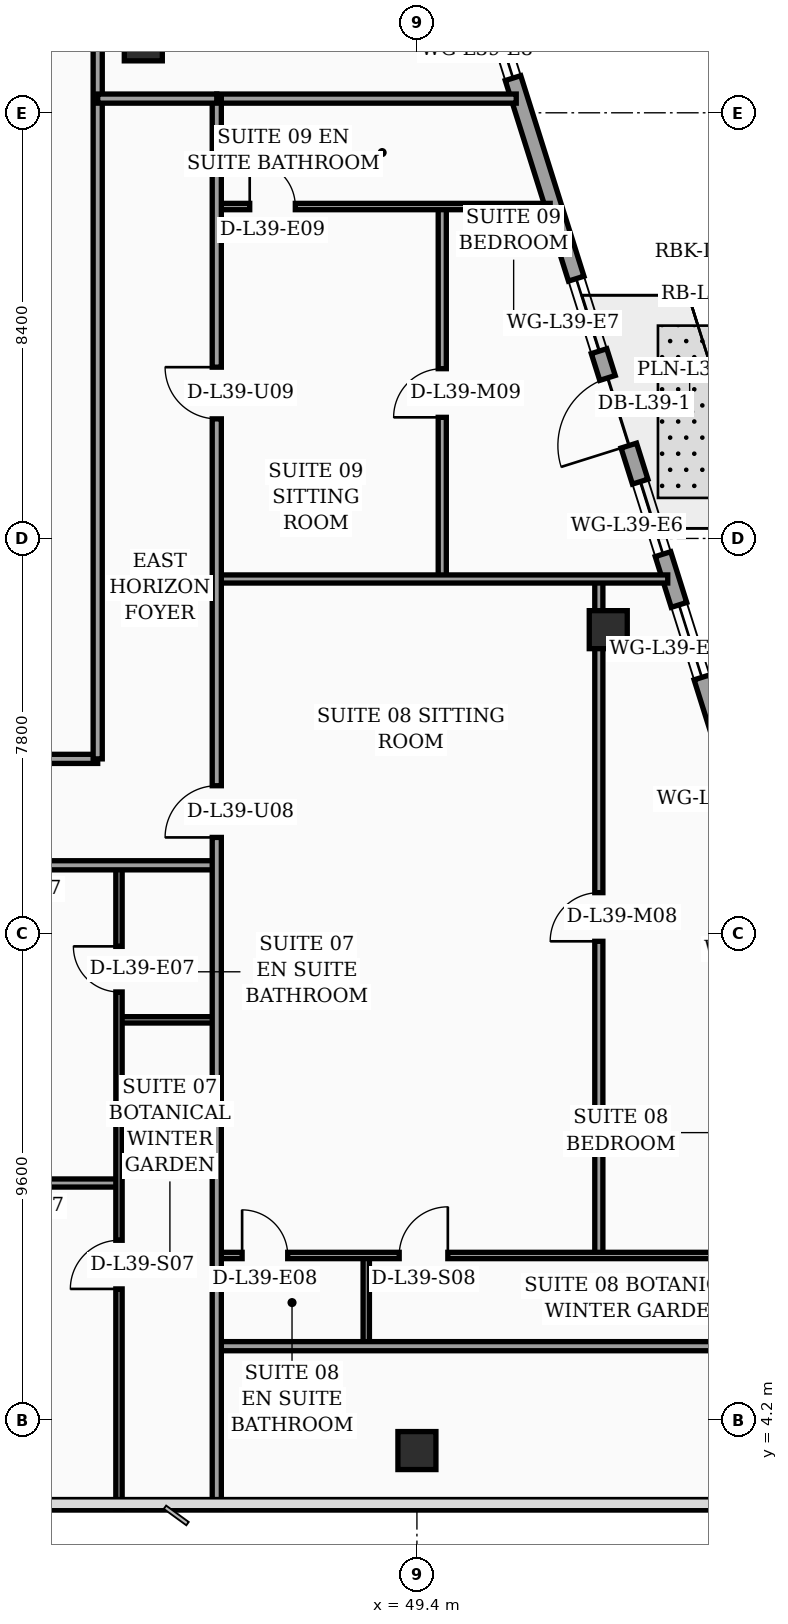
"""IFC4 building model, lengths in metres.
Left out: names, types, materials, properties, quantities, classifications, styles, units other than length and angle.
Written with IfcOpenShell. Run it as: python <this file> out.ifc"""

import sys

from ifc_helpers import new_model, si_unit, direction, frame, frame_2d, origin, origin_2d, place, context, subcontext, project, spatial, rectangle, hollow_rectangle, extrude, element, fill, save


model = new_model("IFC4")
c1 = context("Model", 3, precision=1e-05, world=origin(), true_north=direction((0.0, 1.0)))
c2 = subcontext(c1, "Body", "Model", "MODEL_VIEW")
j1 = project(units=[si_unit("LENGTHUNIT", "METRE"), si_unit("PLANEANGLEUNIT", "RADIAN")], contexts=[c1])
p1 = place(None, origin())
s1 = spatial("IfcSite", under=j1, at=p1, CompositionType="ELEMENT")
p2 = place(p1, origin())
s2 = spatial("IfcBuilding", under=s1, at=p2, CompositionType="ELEMENT")
p3 = place(p2, frame((0.0, 0.0, 159.9)))
s3 = spatial("IfcBuildingStorey", under=s2, at=p3, CompositionType="ELEMENT", Elevation=159.9)
for number, where, z_axis, x_axis in (
    (1, (49.4, 3.6, 0.0), (0.0, 0.0, 1.0), (1.0, 0.0, 0.0)),
    (2, (44.0, 31.4, 0.0), (0.0, 0.0, 1.0), (1.0, 0.0, 0.0)),
    (3, (53.176, 19.8, 0.0), (0.0, 0.0, 1.0), (1.0, 0.0, 0.0)),
):
    element("IfcColumn", number, at=place(p3, frame(where, z_axis=z_axis, x_axis=x_axis)), inside=s3, PredefinedType="COLUMN", context=c2, shape_type="SweptSolid", body=[
        extrude(hollow_rectangle(XDim=0.75, YDim=0.75, WallThickness=0.032, at=origin_2d()), origin(), (0.0, 0.0, 1.0), 3.56),
    ])
p4 = place(p3, frame((59.23, 5.505, 0.0), z_axis=(0.0, 0.0, 1.0), x_axis=(-0.300509063924, 0.953778958931, 0.0)))
e4 = element("IfcWall", 4, at=p4, inside=s3, PredefinedType="SOLIDWALL", context=c2, shape_type="SweptSolid", body=[
    extrude(rectangle(XDim=30.814, YDim=0.32, at=frame_2d((15.407, 0.0))), origin(), (0.0, 0.0, 1.0), 3.56),
])
p5 = place(p4, frame((18.796, 0.0, 0.0)))
e5 = element("IfcOpeningElement", 5, at=p5, cuts=e4, PredefinedType="OPENING", context=c2, shape_type="SweptSolid", body=[
    extrude(rectangle(XDim=1.4, YDim=2.25, at=frame_2d((0.7, 1.125))), frame((0.0, 0.17, 0.0), z_axis=(0.0, -1.0, 0.0), x_axis=(1.0, 0.0, 0.0)), (0.0, 0.0, 1.0), 0.34),
])
p6 = place(p4, frame((2.65, 0.0, 0.75)))
e6 = element("IfcOpeningElement", 6, at=p6, cuts=e4, PredefinedType="OPENING", context=c2, shape_type="SweptSolid", body=[
    extrude(rectangle(XDim=1.5, YDim=1.6, at=frame_2d((0.75, 0.8))), frame((0.0, 0.17, 0.0), z_axis=(0.0, -1.0, 0.0), x_axis=(1.0, 0.0, 0.0)), (0.0, 0.0, 1.0), 0.34),
])
p7 = place(p4, frame((4.7, 0.0, 0.75)))
e7 = element("IfcOpeningElement", 7, at=p7, cuts=e4, PredefinedType="OPENING", context=c2, shape_type="SweptSolid", body=[
    extrude(rectangle(XDim=1.5, YDim=1.6, at=frame_2d((0.75, 0.8))), frame((0.0, 0.17, 0.0), z_axis=(0.0, -1.0, 0.0), x_axis=(1.0, 0.0, 0.0)), (0.0, 0.0, 1.0), 0.34),
])
p8 = place(p4, frame((7.8, 0.0, 0.75)))
e8 = element("IfcOpeningElement", 8, at=p8, cuts=e4, PredefinedType="OPENING", context=c2, shape_type="SweptSolid", body=[
    extrude(rectangle(XDim=1.5, YDim=1.6, at=frame_2d((0.75, 0.8))), frame((0.0, 0.17, 0.0), z_axis=(0.0, -1.0, 0.0), x_axis=(1.0, 0.0, 0.0)), (0.0, 0.0, 1.0), 0.34),
])
p9 = place(p4, frame((10.9, 0.0, 0.75)))
e9 = element("IfcOpeningElement", 9, at=p9, cuts=e4, PredefinedType="OPENING", context=c2, shape_type="SweptSolid", body=[
    extrude(rectangle(XDim=1.5, YDim=1.6, at=frame_2d((0.75, 0.8))), frame((0.0, 0.17, 0.0), z_axis=(0.0, -1.0, 0.0), x_axis=(1.0, 0.0, 0.0)), (0.0, 0.0, 1.0), 0.34),
])
p10 = place(p4, frame((14.0, 0.0, 0.75)))
e10 = element("IfcOpeningElement", 10, at=p10, cuts=e4, PredefinedType="OPENING", context=c2, shape_type="SweptSolid", body=[
    extrude(rectangle(XDim=1.5, YDim=1.6, at=frame_2d((0.75, 0.8))), frame((0.0, 0.17, 0.0), z_axis=(0.0, -1.0, 0.0), x_axis=(1.0, 0.0, 0.0)), (0.0, 0.0, 1.0), 0.34),
])
p11 = place(p4, frame((16.55, 0.0, 0.75)))
e11 = element("IfcOpeningElement", 11, at=p11, cuts=e4, PredefinedType="OPENING", context=c2, shape_type="SweptSolid", body=[
    extrude(rectangle(XDim=1.5, YDim=1.6, at=frame_2d((0.75, 0.8))), frame((0.0, 0.17, 0.0), z_axis=(0.0, -1.0, 0.0), x_axis=(1.0, 0.0, 0.0)), (0.0, 0.0, 1.0), 0.34),
])
p12 = place(p4, frame((20.75, 0.0, 0.75)))
e12 = element("IfcOpeningElement", 12, at=p12, cuts=e4, PredefinedType="OPENING", context=c2, shape_type="SweptSolid", body=[
    extrude(rectangle(XDim=1.5, YDim=1.6, at=frame_2d((0.75, 0.8))), frame((0.0, 0.17, 0.0), z_axis=(0.0, -1.0, 0.0), x_axis=(1.0, 0.0, 0.0)), (0.0, 0.0, 1.0), 0.34),
])
p13 = place(p4, frame((26.4, 0.0, 0.75)))
e13 = element("IfcOpeningElement", 13, at=p13, cuts=e4, PredefinedType="OPENING", context=c2, shape_type="SweptSolid", body=[
    extrude(rectangle(XDim=1.5, YDim=1.6, at=frame_2d((0.75, 0.8))), frame((0.0, 0.17, 0.0), z_axis=(0.0, -1.0, 0.0), x_axis=(1.0, 0.0, 0.0)), (0.0, 0.0, 1.0), 0.34),
])
p14 = place(p3, frame((43.52, 12.1, 0.0), z_axis=(0.0, 0.0, 1.0), x_axis=(1.0, 0.0, 0.0)))
e14 = element("IfcWall", 14, at=p14, inside=s3, PredefinedType="PARTITIONING", context=c2, shape_type="SweptSolid", body=[
    extrude(rectangle(XDim=1.93, YDim=0.125, at=frame_2d((0.965, 0.0))), origin(), (0.0, 0.0, 1.0), 3.56),
])
p15 = place(p3, frame((39.15, 8.88, 0.0), z_axis=(0.0, 0.0, 1.0), x_axis=(1.0, 0.0, 0.0)))
e15 = element("IfcWall", 15, at=p15, inside=s3, PredefinedType="PARTITIONING", context=c2, shape_type="SweptSolid", body=[
    extrude(rectangle(XDim=4.37, YDim=0.16, at=frame_2d((2.185, 0.0))), origin(), (0.0, 0.0, 1.0), 3.56),
])
p16 = place(p15, frame((1.71, 0.0, 0.0)))
e16 = element("IfcOpeningElement", 16, at=p16, cuts=e15, PredefinedType="OPENING", context=c2, shape_type="SweptSolid", body=[
    extrude(rectangle(XDim=0.96, YDim=2.2, at=frame_2d((0.48, 1.1))), frame((0.0, 0.09, 0.0), z_axis=(0.0, -1.0, 0.0), x_axis=(1.0, 0.0, 0.0)), (0.0, 0.0, 1.0), 0.18),
])
p17 = place(p3, frame((43.52, 2.44, 0.0), z_axis=(0.0, 0.0, 1.0), x_axis=(0.0, 1.0, 0.0)))
e17 = element("IfcWall", 17, at=p17, inside=s3, PredefinedType="PARTITIONING", context=c2, shape_type="SweptSolid", body=[
    extrude(rectangle(XDim=12.71, YDim=0.125, at=frame_2d((6.355, 0.0))), origin(), (0.0, 0.0, 1.0), 3.04),
])
p18 = place(p17, frame((4.35, 0.0, 0.0)))
e18 = element("IfcOpeningElement", 18, at=p18, cuts=e17, PredefinedType="OPENING", context=c2, shape_type="SweptSolid", body=[
    extrude(rectangle(XDim=0.96, YDim=2.2, at=frame_2d((0.48, 1.1))), frame((0.0, 0.073, 0.0), z_axis=(0.0, -1.0, 0.0), x_axis=(1.0, 0.0, 0.0)), (0.0, 0.0, 1.0), 0.145),
])
p19 = place(p17, frame((10.21, 0.0, 0.0)))
e19 = element("IfcOpeningElement", 19, at=p19, cuts=e17, PredefinedType="OPENING", context=c2, shape_type="SweptSolid", body=[
    extrude(rectangle(XDim=0.9, YDim=2.15, at=frame_2d((0.45, 1.075))), frame((0.0, 0.073, 0.0), z_axis=(0.0, -1.0, 0.0), x_axis=(1.0, 0.0, 0.0)), (0.0, 0.0, 1.0), 0.145),
])
p20 = place(p3, frame((32.4, 15.15, 0.0), z_axis=(0.0, 0.0, 1.0), x_axis=(1.0, 0.0, 0.0)))
e20 = element("IfcWall", 20, at=p20, inside=s3, PredefinedType="PARTITIONING", context=c2, shape_type="SweptSolid", body=[
    extrude(rectangle(XDim=13.05, YDim=0.18, at=frame_2d((6.525, 0.0))), origin(), (0.0, 0.0, 1.0), 2.94),
])
p21 = place(p20, frame((2.0, 0.0, 0.0)))
e21 = element("IfcOpeningElement", 21, at=p21, cuts=e20, PredefinedType="OPENING", context=c2, shape_type="SweptSolid", body=[
    extrude(rectangle(XDim=1.02, YDim=2.2, at=frame_2d((0.51, 1.1))), frame((0.0, 0.1, 0.0), z_axis=(0.0, -1.0, 0.0), x_axis=(1.0, 0.0, 0.0)), (0.0, 0.0, 1.0), 0.2),
])
p22 = place(p20, frame((8.43, 0.0, 0.0)))
e22 = element("IfcOpeningElement", 22, at=p22, cuts=e20, PredefinedType="OPENING", context=c2, shape_type="SweptSolid", body=[
    extrude(rectangle(XDim=1.02, YDim=2.2, at=frame_2d((0.51, 1.1))), frame((0.0, 0.1, 0.0), z_axis=(0.0, -1.0, 0.0), x_axis=(1.0, 0.0, 0.0)), (0.0, 0.0, 1.0), 0.2),
])
p23 = place(p3, frame((21.5, 17.25, 0.0), z_axis=(0.0, 0.0, 1.0), x_axis=(1.0, 0.0, 0.0)))
e23 = element("IfcWall", 23, at=p23, inside=s3, PredefinedType="PARTITIONING", context=c2, shape_type="SweptSolid", body=[
    extrude(rectangle(XDim=21.6, YDim=0.18, at=frame_2d((10.8, 0.0))), origin(), (0.0, 0.0, 1.0), 2.94),
])
p24 = place(p23, frame((0.95, 0.0, 0.0)))
e24 = element("IfcOpeningElement", 24, at=p24, cuts=e23, PredefinedType="OPENING", context=c2, shape_type="SweptSolid", body=[
    extrude(rectangle(XDim=1.02, YDim=2.2, at=frame_2d((0.51, 1.1))), frame((0.0, 0.1, 0.0), z_axis=(0.0, -1.0, 0.0), x_axis=(1.0, 0.0, 0.0)), (0.0, 0.0, 1.0), 0.2),
])
p25 = place(p23, frame((8.77, 0.0, 0.0)))
e25 = element("IfcOpeningElement", 25, at=p25, cuts=e23, PredefinedType="OPENING", context=c2, shape_type="SweptSolid", body=[
    extrude(rectangle(XDim=1.02, YDim=2.2, at=frame_2d((0.51, 1.1))), frame((0.0, 0.1, 0.0), z_axis=(0.0, -1.0, 0.0), x_axis=(1.0, 0.0, 0.0)), (0.0, 0.0, 1.0), 0.2),
])
p26 = place(p23, frame((15.28, 0.0, 0.0)))
e26 = element("IfcOpeningElement", 26, at=p26, cuts=e23, PredefinedType="OPENING", context=c2, shape_type="SweptSolid", body=[
    extrude(rectangle(XDim=1.02, YDim=2.2, at=frame_2d((0.51, 1.1))), frame((0.0, 0.1, 0.0), z_axis=(0.0, -1.0, 0.0), x_axis=(1.0, 0.0, 0.0)), (0.0, 0.0, 1.0), 0.2),
])
p27 = place(p3, frame((43.1, 17.25, 0.0), z_axis=(0.0, 0.0, 1.0), x_axis=(0.0, 1.0, 0.0)))
e27 = element("IfcWall", 27, at=p27, inside=s3, PredefinedType="PARTITIONING", context=c2, shape_type="SweptSolid", body=[
    extrude(rectangle(XDim=19.21, YDim=0.18, at=frame_2d((9.605, 0.0))), origin(), (0.0, 0.0, 1.0), 2.94),
])
p28 = place(p3, frame((48.4, 5.66, 0.0), z_axis=(0.0, 0.0, 1.0), x_axis=(0.0, 1.0, 0.0)))
e28 = element("IfcWall", 28, at=p28, inside=s3, PredefinedType="PARTITIONING", context=c2, shape_type="SweptSolid", body=[
    extrude(rectangle(XDim=1.79, YDim=0.125, at=frame_2d((0.895, 0.0))), origin(), (0.0, 0.0, 1.0), 2.94),
])
p29 = place(p3, frame((52.99, 7.45, 0.0), z_axis=(0.0, 0.0, 1.0), x_axis=(0.0, 1.0, 0.0)))
e29 = element("IfcWall", 29, at=p29, inside=s3, PredefinedType="PARTITIONING", context=c2, shape_type="SweptSolid", body=[
    extrude(rectangle(XDim=13.35, YDim=0.16, at=frame_2d((6.675, 0.0))), origin(), (0.0, 0.0, 1.0), 2.94),
])
p30 = place(p29, frame((6.2, 0.0, 0.0)))
e30 = element("IfcOpeningElement", 30, at=p30, cuts=e29, PredefinedType="OPENING", context=c2, shape_type="SweptSolid", body=[
    extrude(rectangle(XDim=0.96, YDim=2.2, at=frame_2d((0.48, 1.1))), frame((0.0, 0.09, 0.0), z_axis=(0.0, -1.0, 0.0), x_axis=(1.0, 0.0, 0.0)), (0.0, 0.0, 1.0), 0.18),
])
p31 = place(p3, frame((45.45, 7.45, 0.0), z_axis=(0.0, 0.0, 1.0), x_axis=(1.0, 0.0, 0.0)))
e31 = element("IfcWall", 31, at=p31, inside=s3, PredefinedType="PARTITIONING", context=c2, shape_type="SweptSolid", body=[
    extrude(rectangle(XDim=13.11, YDim=0.125, at=frame_2d((6.555, 0.0))), origin(), (0.0, 0.0, 1.0), 2.94),
])
p32 = place(p31, frame((0.5, 0.0, 0.0)))
e32 = element("IfcOpeningElement", 32, at=p32, cuts=e31, PredefinedType="OPENING", context=c2, shape_type="SweptSolid", body=[
    extrude(rectangle(XDim=0.9, YDim=2.15, at=frame_2d((0.45, 1.075))), frame((0.0, 0.073, 0.0), z_axis=(0.0, -1.0, 0.0), x_axis=(1.0, 0.0, 0.0)), (0.0, 0.0, 1.0), 0.145),
])
p33 = place(p31, frame((3.6, 0.0, 0.0)))
e33 = element("IfcOpeningElement", 33, at=p33, cuts=e31, PredefinedType="OPENING", context=c2, shape_type="SweptSolid", body=[
    extrude(rectangle(XDim=0.96, YDim=2.2, at=frame_2d((0.48, 1.1))), frame((0.0, 0.073, 0.0), z_axis=(0.0, -1.0, 0.0), x_axis=(1.0, 0.0, 0.0)), (0.0, 0.0, 1.0), 0.145),
])
p34 = place(p3, frame((45.45, 5.66, 0.0), z_axis=(0.0, 0.0, 1.0), x_axis=(1.0, 0.0, 0.0)))
e34 = element("IfcWall", 34, at=p34, inside=s3, PredefinedType="PARTITIONING", context=c2, shape_type="SweptSolid", body=[
    extrude(rectangle(XDim=10.55, YDim=0.18, at=frame_2d((5.275, 0.0))), origin(), (0.0, 0.0, 1.0), 2.94),
])
p35 = place(p3, frame((49.9, 20.8, 0.0), z_axis=(0.0, 0.0, 1.0), x_axis=(0.0, 1.0, 0.0)))
e35 = element("IfcWall", 35, at=p35, inside=s3, PredefinedType="PARTITIONING", context=c2, shape_type="SweptSolid", body=[
    extrude(rectangle(XDim=7.35, YDim=0.16, at=frame_2d((3.675, 0.0))), origin(), (0.0, 0.0, 1.0), 3.04),
])
p36 = place(p35, frame((3.19, 0.0, 0.0)))
e36 = element("IfcOpeningElement", 36, at=p36, cuts=e35, PredefinedType="OPENING", context=c2, shape_type="SweptSolid", body=[
    extrude(rectangle(XDim=0.96, YDim=2.2, at=frame_2d((0.48, 1.1))), frame((0.0, 0.09, 0.0), z_axis=(0.0, -1.0, 0.0), x_axis=(1.0, 0.0, 0.0)), (0.0, 0.0, 1.0), 0.18),
])
p37 = place(p3, frame((45.45, 28.15, 0.0), z_axis=(0.0, 0.0, 1.0), x_axis=(1.0, 0.0, 0.0)))
e37 = element("IfcWall", 37, at=p37, inside=s3, PredefinedType="PARTITIONING", context=c2, shape_type="SweptSolid", body=[
    extrude(rectangle(XDim=6.58, YDim=0.125, at=frame_2d((3.29, 0.0))), origin(), (0.0, 0.0, 1.0), 3.04),
])
p38 = place(p37, frame((0.65, 0.0, 0.0)))
e38 = element("IfcOpeningElement", 38, at=p38, cuts=e37, PredefinedType="OPENING", context=c2, shape_type="SweptSolid", body=[
    extrude(rectangle(XDim=0.9, YDim=2.15, at=frame_2d((0.45, 1.075))), frame((0.0, 0.073, 0.0), z_axis=(0.0, -1.0, 0.0), x_axis=(1.0, 0.0, 0.0)), (0.0, 0.0, 1.0), 0.145),
])
p39 = place(p3, frame((45.45, 20.8, 0.0), z_axis=(0.0, 0.0, 1.0), x_axis=(1.0, 0.0, 0.0)))
e39 = element("IfcWall", 39, at=p39, inside=s3, PredefinedType="PARTITIONING", context=c2, shape_type="SweptSolid", body=[
    extrude(rectangle(XDim=8.9, YDim=0.16, at=frame_2d((4.45, 0.0))), origin(), (0.0, 0.0, 1.0), 2.94),
])
p40 = place(p3, frame((45.45, 30.28, 0.0), z_axis=(0.0, 0.0, 1.0), x_axis=(1.0, 0.0, 0.0)))
e40 = element("IfcWall", 40, at=p40, inside=s3, PredefinedType="PARTITIONING", context=c2, shape_type="SweptSolid", body=[
    extrude(rectangle(XDim=5.91, YDim=0.18, at=frame_2d((2.955, 0.0))), origin(), (0.0, 0.0, 1.0), 2.94),
])
p41 = place(p3, frame((45.45, 2.44, 0.0), z_axis=(0.0, 0.0, 1.0), x_axis=(0.0, 1.0, 0.0)))
e41 = element("IfcWall", 41, at=p41, inside=s3, PredefinedType="PARTITIONING", context=c2, shape_type="SweptSolid", body=[
    extrude(rectangle(XDim=27.84, YDim=0.18, at=frame_2d((13.92, 0.0))), origin(), (0.0, 0.0, 1.0), 2.94),
])
p42 = place(p41, frame((13.26, 0.0, 0.0)))
e42 = element("IfcOpeningElement", 42, at=p42, cuts=e41, PredefinedType="OPENING", context=c2, shape_type="SweptSolid", body=[
    extrude(rectangle(XDim=1.02, YDim=2.2, at=frame_2d((0.51, 1.1))), frame((0.0, 0.1, 0.0), z_axis=(0.0, -1.0, 0.0), x_axis=(1.0, 0.0, 0.0)), (0.0, 0.0, 1.0), 0.2),
])
p43 = place(p41, frame((21.52, 0.0, 0.0)))
e43 = element("IfcOpeningElement", 43, at=p43, cuts=e41, PredefinedType="OPENING", context=c2, shape_type="SweptSolid", body=[
    extrude(rectangle(XDim=1.02, YDim=2.2, at=frame_2d((0.51, 1.1))), frame((0.0, 0.1, 0.0), z_axis=(0.0, -1.0, 0.0), x_axis=(1.0, 0.0, 0.0)), (0.0, 0.0, 1.0), 0.2),
])
p44 = place(p3, frame((43.1, 30.28, 0.0), z_axis=(0.0, 0.0, 1.0), x_axis=(1.0, 0.0, 0.0)))
e44 = element("IfcWall", 44, at=p44, inside=s3, PredefinedType="PARTITIONING", context=c2, shape_type="SweptSolid", body=[
    extrude(rectangle(XDim=2.35, YDim=0.18, at=frame_2d((1.175, 0.0))), origin(), (0.0, 0.0, 1.0), 2.94),
])
p45 = place(p5, origin())
e45 = element("IfcDoor", 45, at=p45, inside=s3, OperationType="SINGLE_SWING_LEFT", PredefinedType="DOOR", context=c2, shape_type="SweptSolid", body=[
    extrude(rectangle(XDim=1.4, YDim=2.25, at=frame_2d((0.7, 1.125))), frame((0.0, 0.025, 0.0), z_axis=(0.0, -1.0, 0.0), x_axis=(1.0, 0.0, 0.0)), (0.0, 0.0, 1.0), 0.05),
])
fill(e5, e45)
p46 = place(p10, origin())
e46 = element("IfcWindow", 46, at=p46, inside=s3, PartitioningType="SINGLE_PANEL", PredefinedType="WINDOW", context=c2, shape_type="SweptSolid", body=[
    extrude(rectangle(XDim=1.5, YDim=1.6, at=frame_2d((0.75, 0.8))), frame((0.0, 0.03, 0.0), z_axis=(0.0, -1.0, 0.0), x_axis=(1.0, 0.0, 0.0)), (0.0, 0.0, 1.0), 0.06),
])
fill(e10, e46)
p47 = place(p11, origin())
e47 = element("IfcWindow", 47, at=p47, inside=s3, PartitioningType="SINGLE_PANEL", PredefinedType="WINDOW", context=c2, shape_type="SweptSolid", body=[
    extrude(rectangle(XDim=1.5, YDim=1.6, at=frame_2d((0.75, 0.8))), frame((0.0, 0.03, 0.0), z_axis=(0.0, -1.0, 0.0), x_axis=(1.0, 0.0, 0.0)), (0.0, 0.0, 1.0), 0.06),
])
fill(e11, e47)
p48 = place(p12, origin())
e48 = element("IfcWindow", 48, at=p48, inside=s3, PartitioningType="SINGLE_PANEL", PredefinedType="WINDOW", context=c2, shape_type="SweptSolid", body=[
    extrude(rectangle(XDim=1.5, YDim=1.6, at=frame_2d((0.75, 0.8))), frame((0.0, 0.03, 0.0), z_axis=(0.0, -1.0, 0.0), x_axis=(1.0, 0.0, 0.0)), (0.0, 0.0, 1.0), 0.06),
])
fill(e12, e48)
p49 = place(p13, origin())
e49 = element("IfcWindow", 49, at=p49, inside=s3, PartitioningType="SINGLE_PANEL", PredefinedType="WINDOW", context=c2, shape_type="SweptSolid", body=[
    extrude(rectangle(XDim=1.5, YDim=1.6, at=frame_2d((0.75, 0.8))), frame((0.0, 0.03, 0.0), z_axis=(0.0, -1.0, 0.0), x_axis=(1.0, 0.0, 0.0)), (0.0, 0.0, 1.0), 0.06),
])
fill(e13, e49)
p50 = place(p18, origin())
e50 = element("IfcDoor", 50, at=p50, inside=s3, OperationType="SINGLE_SWING_LEFT", PredefinedType="DOOR", context=c2, shape_type="SweptSolid", body=[
    extrude(rectangle(XDim=0.96, YDim=2.2, at=frame_2d((0.48, 1.1))), frame((0.0, 0.025, 0.0), z_axis=(0.0, -1.0, 0.0), x_axis=(1.0, 0.0, 0.0)), (0.0, 0.0, 1.0), 0.05),
])
fill(e18, e50)
p51 = place(p19, origin())
e51 = element("IfcDoor", 51, at=p51, inside=s3, OperationType="SINGLE_SWING_RIGHT", PredefinedType="DOOR", context=c2, shape_type="SweptSolid", body=[
    extrude(rectangle(XDim=0.9, YDim=2.15, at=frame_2d((0.45, 1.075))), frame((0.0, 0.025, 0.0), z_axis=(0.0, -1.0, 0.0), x_axis=(1.0, 0.0, 0.0)), (0.0, 0.0, 1.0), 0.05),
])
fill(e19, e51)
p52 = place(p30, origin())
e52 = element("IfcDoor", 52, at=p52, inside=s3, OperationType="SINGLE_SWING_LEFT", PredefinedType="DOOR", context=c2, shape_type="SweptSolid", body=[
    extrude(rectangle(XDim=0.96, YDim=2.2, at=frame_2d((0.48, 1.1))), frame((0.0, 0.025, 0.0), z_axis=(0.0, -1.0, 0.0), x_axis=(1.0, 0.0, 0.0)), (0.0, 0.0, 1.0), 0.05),
])
fill(e30, e52)
p53 = place(p32, origin())
e53 = element("IfcDoor", 53, at=p53, inside=s3, OperationType="SINGLE_SWING_LEFT", PredefinedType="DOOR", context=c2, shape_type="SweptSolid", body=[
    extrude(rectangle(XDim=0.9, YDim=2.15, at=frame_2d((0.45, 1.075))), frame((0.0, 0.025, 0.0), z_axis=(0.0, -1.0, 0.0), x_axis=(1.0, 0.0, 0.0)), (0.0, 0.0, 1.0), 0.05),
])
fill(e32, e53)
p54 = place(p33, origin())
e54 = element("IfcDoor", 54, at=p54, inside=s3, OperationType="SINGLE_SWING_RIGHT", PredefinedType="DOOR", context=c2, shape_type="SweptSolid", body=[
    extrude(rectangle(XDim=0.96, YDim=2.2, at=frame_2d((0.48, 1.1))), frame((0.0, 0.025, 0.0), z_axis=(0.0, -1.0, 0.0), x_axis=(1.0, 0.0, 0.0)), (0.0, 0.0, 1.0), 0.05),
])
fill(e33, e54)
p55 = place(p36, origin())
e55 = element("IfcDoor", 55, at=p55, inside=s3, OperationType="SINGLE_SWING_LEFT", PredefinedType="DOOR", context=c2, shape_type="SweptSolid", body=[
    extrude(rectangle(XDim=0.96, YDim=2.2, at=frame_2d((0.48, 1.1))), frame((0.0, 0.025, 0.0), z_axis=(0.0, -1.0, 0.0), x_axis=(1.0, 0.0, 0.0)), (0.0, 0.0, 1.0), 0.05),
])
fill(e36, e55)
p56 = place(p38, origin())
e56 = element("IfcDoor", 56, at=p56, inside=s3, OperationType="SINGLE_SWING_LEFT", PredefinedType="DOOR", context=c2, shape_type="SweptSolid", body=[
    extrude(rectangle(XDim=0.9, YDim=2.15, at=frame_2d((0.45, 1.075))), frame((0.0, 0.025, 0.0), z_axis=(0.0, -1.0, 0.0), x_axis=(1.0, 0.0, 0.0)), (0.0, 0.0, 1.0), 0.05),
])
fill(e38, e56)
p57 = place(p42, origin())
e57 = element("IfcDoor", 57, at=p57, inside=s3, OperationType="SINGLE_SWING_LEFT", PredefinedType="DOOR", context=c2, shape_type="SweptSolid", body=[
    extrude(rectangle(XDim=1.02, YDim=2.2, at=frame_2d((0.51, 1.1))), frame((0.0, 0.025, 0.0), z_axis=(0.0, -1.0, 0.0), x_axis=(1.0, 0.0, 0.0)), (0.0, 0.0, 1.0), 0.05),
])
fill(e42, e57)
p58 = place(p43, origin())
e58 = element("IfcDoor", 58, at=p58, inside=s3, OperationType="SINGLE_SWING_RIGHT", PredefinedType="DOOR", context=c2, shape_type="SweptSolid", body=[
    extrude(rectangle(XDim=1.02, YDim=2.2, at=frame_2d((0.51, 1.1))), frame((0.0, 0.025, 0.0), z_axis=(0.0, -1.0, 0.0), x_axis=(1.0, 0.0, 0.0)), (0.0, 0.0, 1.0), 0.05),
])
fill(e43, e58)
save(model, sys.argv[1])
